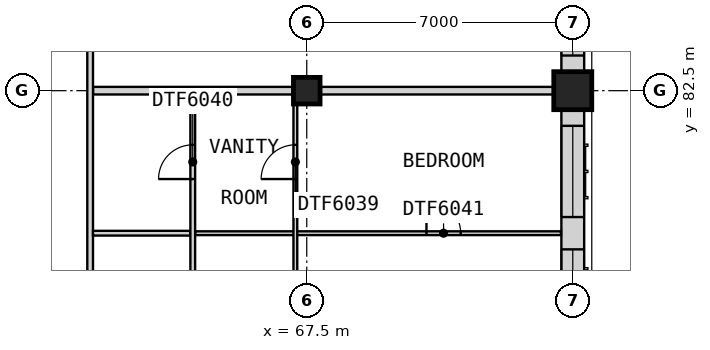
"""IFC4 building model, lengths in metres.
Left out: names, types, materials, properties, quantities, classifications, styles, units other than length and angle.
Written with IfcOpenShell. Run it as: python <this file> out.ifc"""

import sys

from ifc_helpers import new_model, si_unit, direction, frame, frame_2d, origin, origin_2d, place, context, subcontext, project, spatial, rectangle, extrude, element, fill, save


model = new_model("IFC4")
c1 = context("Model", 3, precision=1e-05, world=origin(), true_north=direction((0.0, 1.0)))
c2 = subcontext(c1, "Body", "Model", "MODEL_VIEW")
j1 = project(units=[si_unit("LENGTHUNIT", "METRE"), si_unit("PLANEANGLEUNIT", "RADIAN")], contexts=[c1])
p1 = place(None, origin())
s1 = spatial("IfcSite", under=j1, at=p1, CompositionType="ELEMENT")
p2 = place(p1, origin())
s2 = spatial("IfcBuilding", under=s1, at=p2, CompositionType="ELEMENT")
p3 = place(p2, frame((0.0, 0.0, 266.2)))
s3 = spatial("IfcBuildingStorey", under=s2, at=p3, CompositionType="ELEMENT", Elevation=266.2)
p4 = place(p3, frame((67.5, 82.5, 0.0), z_axis=(0.0, 0.0, 1.0), x_axis=(1.0, 0.0, 0.0)))
e1 = element("IfcColumn", 1, at=p4, inside=s3, PredefinedType="COLUMN", context=c2, shape_type="SweptSolid", body=[
    extrude(rectangle(XDim=0.7, YDim=0.7, at=origin_2d()), origin(), (0.0, 0.0, 1.0), 3.5),
])
p5 = place(p3, frame((74.5, 82.5, 0.0), z_axis=(0.0, 0.0, 1.0), x_axis=(1.0, 0.0, 0.0)))
e2 = element("IfcColumn", 2, at=p5, inside=s3, PredefinedType="COLUMN", context=c2, shape_type="SweptSolid", body=[
    extrude(rectangle(XDim=1.0, YDim=1.0, at=origin_2d()), origin(), (0.0, 0.0, 1.0), 3.5),
])
p6 = place(p3, frame((74.5, 75.5, 0.0), z_axis=(0.0, 0.0, 1.0), x_axis=(0.0, 1.0, 0.0)))
e3 = element("IfcWall", 3, at=p6, inside=s3, PredefinedType="SOLIDWALL", context=c2, shape_type="SweptSolid", body=[
    extrude(rectangle(XDim=6.5, YDim=0.6, at=frame_2d((3.25, 0.0))), origin(), (0.0, 0.0, 1.0), 2.75),
])
p7 = place(p6, frame((0.425, 0.0, 0.8)))
e4 = element("IfcOpeningElement", 4, at=p7, cuts=e3, PredefinedType="OPENING", context=c2, shape_type="SweptSolid", body=[
    extrude(rectangle(XDim=2.4, YDim=1.8, at=frame_2d((1.2, 0.9))), frame((0.0, 0.31, 0.0), z_axis=(0.0, -1.0, 0.0), x_axis=(1.0, 0.0, 0.0)), (0.0, 0.0, 1.0), 0.62),
])
p8 = place(p6, frame((3.675, 0.0, 0.8)))
e5 = element("IfcOpeningElement", 5, at=p8, cuts=e3, PredefinedType="OPENING", context=c2, shape_type="SweptSolid", body=[
    extrude(rectangle(XDim=2.4, YDim=1.8, at=frame_2d((1.2, 0.9))), frame((0.0, 0.31, 0.0), z_axis=(0.0, -1.0, 0.0), x_axis=(1.0, 0.0, 0.0)), (0.0, 0.0, 1.0), 0.62),
])
p9 = place(p3, frame((74.5, 83.0, 0.0), z_axis=(0.0, 0.0, 1.0), x_axis=(0.0, 1.0, 0.0)))
e6 = element("IfcWall", 6, at=p9, inside=s3, PredefinedType="SOLIDWALL", context=c2, shape_type="SweptSolid", body=[
    extrude(rectangle(XDim=6.5, YDim=0.6, at=frame_2d((3.25, 0.0))), origin(), (0.0, 0.0, 1.0), 2.75),
])
p10 = place(p9, frame((0.425, 0.0, 0.8)))
e7 = element("IfcOpeningElement", 7, at=p10, cuts=e6, PredefinedType="OPENING", context=c2, shape_type="SweptSolid", body=[
    extrude(rectangle(XDim=2.4, YDim=1.8, at=frame_2d((1.2, 0.9))), frame((0.0, 0.31, 0.0), z_axis=(0.0, -1.0, 0.0), x_axis=(1.0, 0.0, 0.0)), (0.0, 0.0, 1.0), 0.62),
])
p11 = place(p9, frame((3.675, 0.0, 0.8)))
e8 = element("IfcOpeningElement", 8, at=p11, cuts=e6, PredefinedType="OPENING", context=c2, shape_type="SweptSolid", body=[
    extrude(rectangle(XDim=2.4, YDim=1.8, at=frame_2d((1.2, 0.9))), frame((0.0, 0.31, 0.0), z_axis=(0.0, -1.0, 0.0), x_axis=(1.0, 0.0, 0.0)), (0.0, 0.0, 1.0), 0.62),
])
p12 = place(p3, frame((61.875, 82.5, 0.0), z_axis=(0.0, 0.0, 1.0), x_axis=(1.0, 0.0, 0.0)))
e9 = element("IfcWall", 9, at=p12, inside=s3, PredefinedType="PARTITIONING", context=c2, shape_type="SweptSolid", body=[
    extrude(rectangle(XDim=13.125, YDim=0.2, at=frame_2d((6.562, 0.0))), origin(), (0.0, 0.0, 1.0), 3.25),
])
p13 = place(p3, frame((61.8, 58.275, 0.0), z_axis=(0.0, 0.0, 1.0), x_axis=(0.0, 1.0, 0.0)))
e10 = element("IfcWall", 10, at=p13, inside=s3, PredefinedType="PARTITIONING", context=c2, shape_type="SweptSolid", body=[
    extrude(rectangle(XDim=25.95, YDim=0.15, at=frame_2d((12.975, 0.0))), origin(), (0.0, 0.0, 1.0), 3.25),
])
p14 = place(p13, frame((3.15, 0.0, 0.0)))
e11 = element("IfcOpeningElement", 11, at=p14, cuts=e10, PredefinedType="OPENING", context=c2, shape_type="SweptSolid", body=[
    extrude(rectangle(XDim=0.9, YDim=2.1, at=frame_2d((0.45, 1.05))), frame((0.0, 0.085, 0.0), z_axis=(0.0, -1.0, 0.0), x_axis=(1.0, 0.0, 0.0)), (0.0, 0.0, 1.0), 0.17),
])
p15 = place(p13, frame((14.4, 0.0, 0.0)))
e12 = element("IfcOpeningElement", 12, at=p15, cuts=e10, PredefinedType="OPENING", context=c2, shape_type="SweptSolid", body=[
    extrude(rectangle(XDim=0.9, YDim=2.1, at=frame_2d((0.45, 1.05))), frame((0.0, 0.085, 0.0), z_axis=(0.0, -1.0, 0.0), x_axis=(1.0, 0.0, 0.0)), (0.0, 0.0, 1.0), 0.17),
])
p16 = place(p3, frame((64.562, 78.75, 0.0), z_axis=(0.0, 0.0, 1.0), x_axis=(1.0, 0.0, 0.0)))
e13 = element("IfcWall", 13, at=p16, inside=s3, PredefinedType="PARTITIONING", context=c2, shape_type="SweptSolid", body=[
    extrude(rectangle(XDim=9.627, YDim=0.1, at=frame_2d((4.814, 0.0))), origin(), (0.0, 0.0, 1.0), 3.25),
])
p17 = place(p16, frame((6.087, 0.0, 0.0)))
e14 = element("IfcOpeningElement", 14, at=p17, cuts=e13, PredefinedType="OPENING", context=c2, shape_type="SweptSolid", body=[
    extrude(rectangle(XDim=0.9, YDim=2.1, at=frame_2d((0.45, 1.05))), frame((0.0, 0.06, 0.0), z_axis=(0.0, -1.0, 0.0), x_axis=(1.0, 0.0, 0.0)), (0.0, 0.0, 1.0), 0.12),
])
p18 = place(p3, frame((67.2, 60.1, 0.0), z_axis=(0.0, 0.0, 1.0), x_axis=(0.0, 1.0, 0.0)))
e15 = element("IfcWall", 15, at=p18, inside=s3, PredefinedType="PARTITIONING", context=c2, shape_type="SweptSolid", body=[
    extrude(rectangle(XDim=22.3, YDim=0.1, at=frame_2d((11.15, 0.0))), origin(), (0.0, 0.0, 1.0), 3.25),
])
p19 = place(p18, frame((1.325, 0.0, 0.0)))
e16 = element("IfcOpeningElement", 16, at=p19, cuts=e15, PredefinedType="OPENING", context=c2, shape_type="SweptSolid", body=[
    extrude(rectangle(XDim=0.9, YDim=2.1, at=frame_2d((0.45, 1.05))), frame((0.0, 0.06, 0.0), z_axis=(0.0, -1.0, 0.0), x_axis=(1.0, 0.0, 0.0)), (0.0, 0.0, 1.0), 0.12),
])
p20 = place(p18, frame((8.825, 0.0, 0.0)))
e17 = element("IfcOpeningElement", 17, at=p20, cuts=e15, PredefinedType="OPENING", context=c2, shape_type="SweptSolid", body=[
    extrude(rectangle(XDim=0.9, YDim=2.1, at=frame_2d((0.45, 1.05))), frame((0.0, 0.06, 0.0), z_axis=(0.0, -1.0, 0.0), x_axis=(1.0, 0.0, 0.0)), (0.0, 0.0, 1.0), 0.12),
])
p21 = place(p18, frame((12.575, 0.0, 0.0)))
e18 = element("IfcOpeningElement", 18, at=p21, cuts=e15, PredefinedType="OPENING", context=c2, shape_type="SweptSolid", body=[
    extrude(rectangle(XDim=0.9, YDim=2.1, at=frame_2d((0.45, 1.05))), frame((0.0, 0.06, 0.0), z_axis=(0.0, -1.0, 0.0), x_axis=(1.0, 0.0, 0.0)), (0.0, 0.0, 1.0), 0.12),
])
p22 = place(p18, frame((20.075, 0.0, 0.0)))
e19 = element("IfcOpeningElement", 19, at=p22, cuts=e15, PredefinedType="OPENING", context=c2, shape_type="SweptSolid", body=[
    extrude(rectangle(XDim=0.9, YDim=2.1, at=frame_2d((0.45, 1.05))), frame((0.0, 0.06, 0.0), z_axis=(0.0, -1.0, 0.0), x_axis=(1.0, 0.0, 0.0)), (0.0, 0.0, 1.0), 0.12),
])
p23 = place(p3, frame((61.875, 78.75, 0.0), z_axis=(0.0, 0.0, 1.0), x_axis=(1.0, 0.0, 0.0)))
e20 = element("IfcWall", 20, at=p23, inside=s3, PredefinedType="PARTITIONING", context=c2, shape_type="SweptSolid", body=[
    extrude(rectangle(XDim=2.562, YDim=0.125, at=frame_2d((1.281, 0.0))), origin(), (0.0, 0.0, 1.0), 3.25),
])
p24 = place(p3, frame((64.5, 75.062, 0.0), z_axis=(0.0, 0.0, 1.0), x_axis=(0.0, 1.0, 0.0)))
e21 = element("IfcWall", 21, at=p24, inside=s3, PredefinedType="PARTITIONING", context=c2, shape_type="SweptSolid", body=[
    extrude(rectangle(XDim=7.337, YDim=0.125, at=frame_2d((3.669, 0.0))), origin(), (0.0, 0.0, 1.0), 3.25),
])
p25 = place(p24, frame((5.113, 0.0, 0.0)))
e22 = element("IfcOpeningElement", 22, at=p25, cuts=e21, PredefinedType="OPENING", context=c2, shape_type="SweptSolid", body=[
    extrude(rectangle(XDim=0.9, YDim=2.1, at=frame_2d((0.45, 1.05))), frame((0.0, 0.073, 0.0), z_axis=(0.0, -1.0, 0.0), x_axis=(1.0, 0.0, 0.0)), (0.0, 0.0, 1.0), 0.145),
])
p26 = place(p7, origin())
e23 = element("IfcWindow", 23, at=p26, inside=s3, PartitioningType="SINGLE_PANEL", PredefinedType="WINDOW", context=c2, shape_type="SweptSolid", body=[
    extrude(rectangle(XDim=2.4, YDim=1.8, at=frame_2d((1.2, 0.9))), frame((0.0, -0.07, 0.0), z_axis=(0.0, -1.0, 0.0), x_axis=(1.0, 0.0, 0.0)), (0.0, 0.0, 1.0), 0.06),
])
fill(e4, e23)
p27 = place(p8, origin())
e24 = element("IfcWindow", 24, at=p27, inside=s3, PartitioningType="SINGLE_PANEL", PredefinedType="WINDOW", context=c2, shape_type="SweptSolid", body=[
    extrude(rectangle(XDim=2.4, YDim=1.8, at=frame_2d((1.2, 0.9))), frame((0.0, -0.07, 0.0), z_axis=(0.0, -1.0, 0.0), x_axis=(1.0, 0.0, 0.0)), (0.0, 0.0, 1.0), 0.06),
])
fill(e5, e24)
p28 = place(p10, origin())
e25 = element("IfcWindow", 25, at=p28, inside=s3, PartitioningType="SINGLE_PANEL", PredefinedType="WINDOW", context=c2, shape_type="SweptSolid", body=[
    extrude(rectangle(XDim=2.4, YDim=1.8, at=frame_2d((1.2, 0.9))), frame((0.0, -0.07, 0.0), z_axis=(0.0, -1.0, 0.0), x_axis=(1.0, 0.0, 0.0)), (0.0, 0.0, 1.0), 0.06),
])
fill(e7, e25)
p29 = place(p22, origin())
e26 = element("IfcDoor", 26, at=p29, inside=s3, OperationType="SINGLE_SWING_LEFT", PredefinedType="DOOR", context=c2, shape_type="SweptSolid", body=[
    extrude(rectangle(XDim=0.9, YDim=2.1, at=frame_2d((0.45, 1.05))), frame((0.0, 0.025, 0.0), z_axis=(0.0, -1.0, 0.0), x_axis=(1.0, 0.0, 0.0)), (0.0, 0.0, 1.0), 0.05),
])
fill(e19, e26)
p30 = place(p25, origin())
e27 = element("IfcDoor", 27, at=p30, inside=s3, OperationType="SINGLE_SWING_LEFT", PredefinedType="DOOR", context=c2, shape_type="SweptSolid", body=[
    extrude(rectangle(XDim=0.9, YDim=2.1, at=frame_2d((0.45, 1.05))), frame((0.0, 0.025, 0.0), z_axis=(0.0, -1.0, 0.0), x_axis=(1.0, 0.0, 0.0)), (0.0, 0.0, 1.0), 0.05),
])
fill(e22, e27)
p31 = place(p17, origin())
e28 = element("IfcDoor", 28, at=p31, inside=s3, OperationType="SINGLE_SWING_RIGHT", PredefinedType="DOOR", context=c2, shape_type="SweptSolid", body=[
    extrude(rectangle(XDim=0.9, YDim=2.1, at=frame_2d((0.45, 1.05))), frame((0.0, 0.025, 0.0), z_axis=(0.0, -1.0, 0.0), x_axis=(1.0, 0.0, 0.0)), (0.0, 0.0, 1.0), 0.05),
])
fill(e14, e28)
save(model, sys.argv[1])
